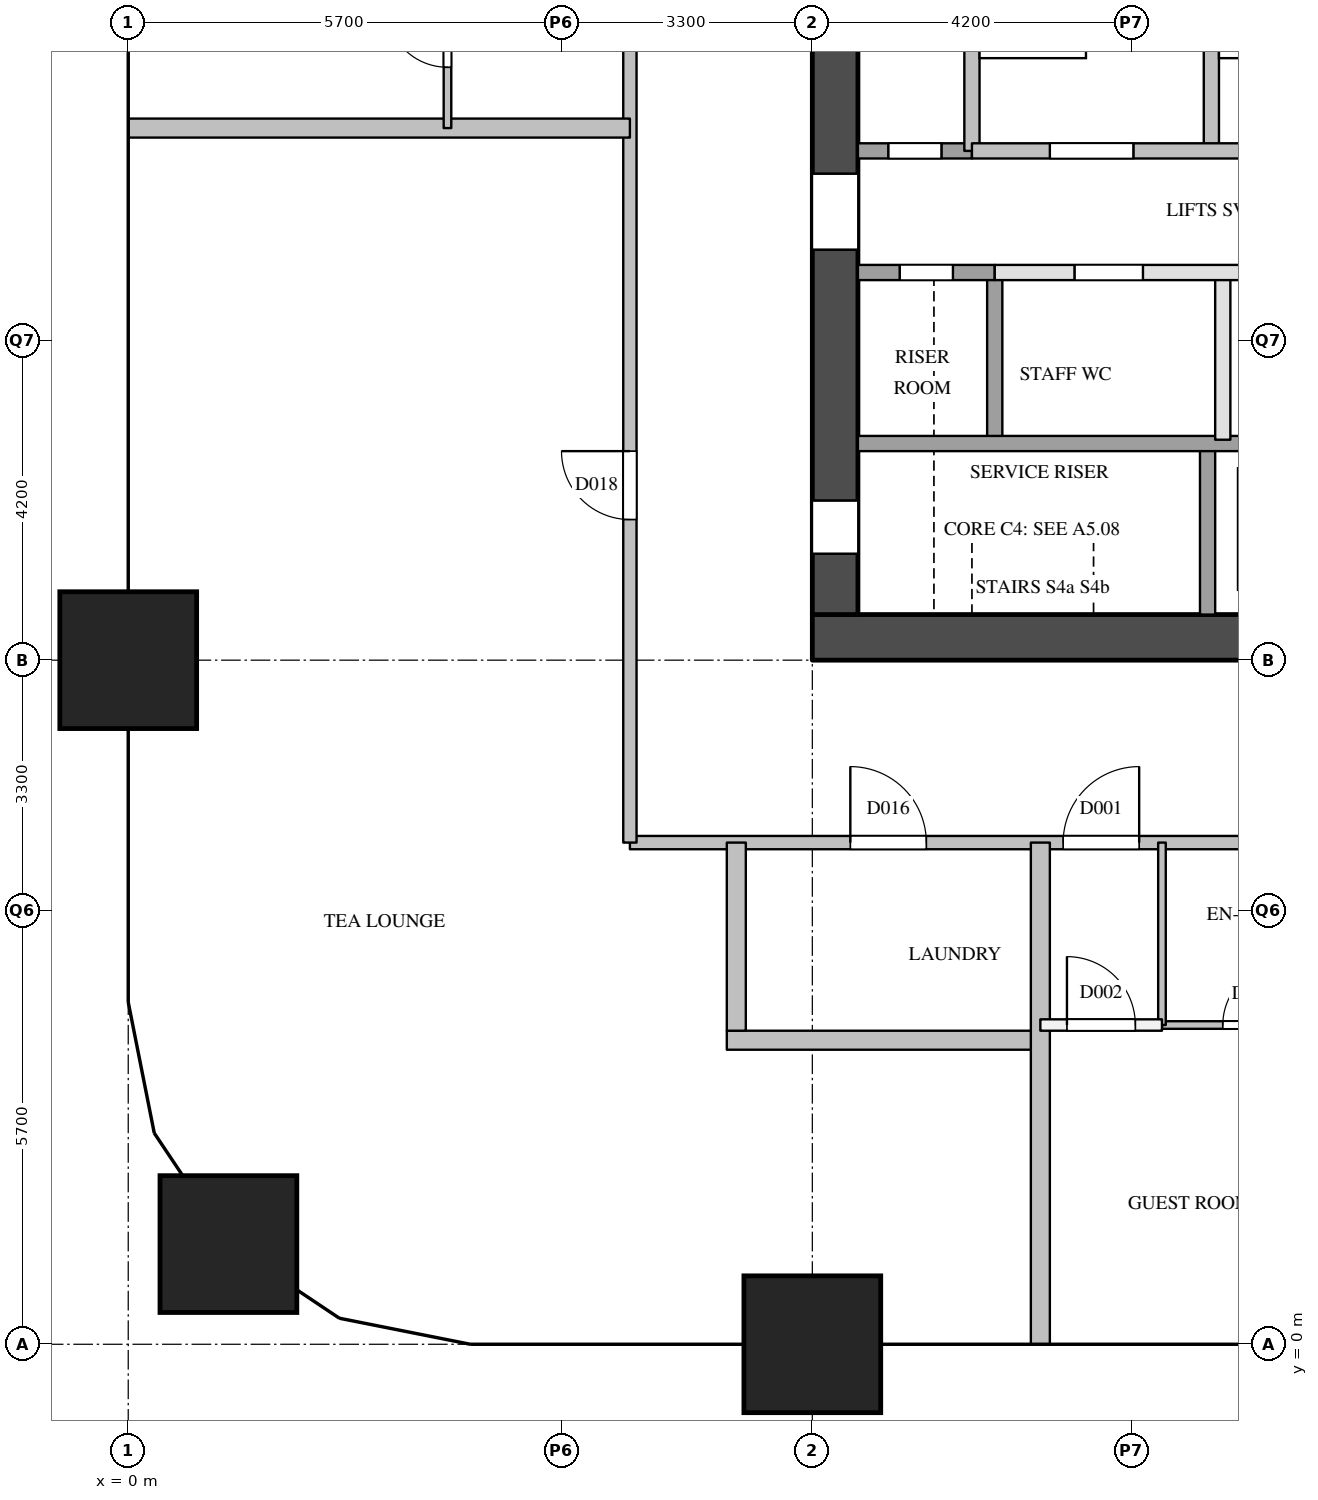
"""IFC4 building model, lengths in metres.
Left out: names, types, materials, properties, quantities, classifications, styles, units other than length and angle.
Written with IfcOpenShell. Run it as: python <this file> out.ifc"""

import sys

from ifc_helpers import new_model, si_unit, direction, frame, frame_2d, origin, origin_2d, place, context, subcontext, project, spatial, rectangle, extrude, element, fill, save


model = new_model("IFC4")
c1 = context("Model", 3, precision=1e-05, world=origin(), true_north=direction((0.0, 1.0)))
c2 = subcontext(c1, "Body", "Model", "MODEL_VIEW")
j1 = project(units=[si_unit("LENGTHUNIT", "METRE"), si_unit("PLANEANGLEUNIT", "RADIAN")], contexts=[c1])
p1 = place(None, origin())
s1 = spatial("IfcSite", under=j1, at=p1, CompositionType="ELEMENT")
p2 = place(p1, origin())
s2 = spatial("IfcBuilding", under=s1, at=p2, CompositionType="ELEMENT")
p3 = place(p2, frame((0.0, 0.0, 38.6)))
s3 = spatial("IfcBuildingStorey", under=s2, at=p3, CompositionType="ELEMENT", Elevation=38.6)
for number, where, z_axis, x_axis in (
    (1, (1.318, 1.318, 0.0), (0.0, 0.0, 1.0), (1.0, 0.0, 0.0)),
    (2, (0.0, 9.0, 0.0), (0.0, 0.0, 1.0), (1.0, 0.0, 0.0)),
    (3, (9.0, 0.0, 0.0), (0.0, 0.0, 1.0), (1.0, 0.0, 0.0)),
):
    element("IfcColumn", number, at=place(p3, frame(where, z_axis=z_axis, x_axis=x_axis)), inside=s3, PredefinedType="COLUMN", context=c2, shape_type="SweptSolid", body=[
        extrude(rectangle(XDim=1.8, YDim=1.8, at=origin_2d()), origin(), (0.0, 0.0, 1.0), 3.8),
    ])
p4 = place(p3, frame((9.0, 9.3, 0.0), z_axis=(0.0, 0.0, 1.0), x_axis=(1.0, 0.0, 0.0)))
e4 = element("IfcWall", 4, at=p4, inside=s3, PredefinedType="SHEAR", context=c2, shape_type="SweptSolid", body=[
    extrude(rectangle(XDim=9.0, YDim=0.6, at=frame_2d((4.5, 0.0))), origin(), (0.0, 0.0, 1.0), 3.5),
])
p5 = place(p3, frame((9.3, 9.6, 0.0), z_axis=(0.0, 0.0, 1.0), x_axis=(0.0, 1.0, 0.0)))
e5 = element("IfcWall", 5, at=p5, inside=s3, PredefinedType="SHEAR", context=c2, shape_type="SweptSolid", body=[
    extrude(rectangle(XDim=12.3, YDim=0.6, at=frame_2d((6.15, 0.0))), origin(), (0.0, 0.0, 1.0), 3.5),
])
p6 = place(p5, frame((0.8, 0.0, 0.0)))
e6 = element("IfcOpeningElement", 6, at=p6, cuts=e5, PredefinedType="OPENING", context=c2, shape_type="SweptSolid", body=[
    extrude(rectangle(XDim=0.7, YDim=2.1, at=frame_2d((0.35, 1.05))), frame((0.0, 0.31, 0.0), z_axis=(0.0, -1.0, 0.0), x_axis=(1.0, 0.0, 0.0)), (0.0, 0.0, 1.0), 0.62),
])
p7 = place(p5, frame((4.8, 0.0, 0.0)))
e7 = element("IfcOpeningElement", 7, at=p7, cuts=e5, PredefinedType="OPENING", context=c2, shape_type="SweptSolid", body=[
    extrude(rectangle(XDim=1.0, YDim=2.1, at=frame_2d((0.5, 1.05))), frame((0.0, 0.31, 0.0), z_axis=(0.0, -1.0, 0.0), x_axis=(1.0, 0.0, 0.0)), (0.0, 0.0, 1.0), 0.62),
])
p8 = place(p3, frame((11.1, 15.7, 0.0), z_axis=(0.0, 0.0, 1.0), x_axis=(0.0, 1.0, 0.0)))
e8 = element("IfcWall", 8, at=p8, inside=s3, PredefinedType="SOLIDWALL", context=c2, shape_type="SweptSolid", body=[
    extrude(rectangle(XDim=4.3, YDim=0.2, at=frame_2d((2.15, 0.0))), origin(), (0.0, 0.0, 1.0), 3.5),
])
p9 = place(p3, frame((11.4, 11.9, 0.0), z_axis=(0.0, 0.0, 1.0), x_axis=(0.0, 1.0, 0.0)))
e9 = element("IfcWall", 9, at=p9, inside=s3, PredefinedType="SOLIDWALL", context=c2, shape_type="SweptSolid", body=[
    extrude(rectangle(XDim=2.2, YDim=0.2, at=frame_2d((1.1, 0.0))), origin(), (0.0, 0.0, 1.0), 3.5),
])
p10 = place(p3, frame((14.2, 9.6, 0.0), z_axis=(0.0, 0.0, 1.0), x_axis=(0.0, 1.0, 0.0)))
e10 = element("IfcWall", 10, at=p10, inside=s3, PredefinedType="SOLIDWALL", context=c2, shape_type="SweptSolid", body=[
    extrude(rectangle(XDim=2.3, YDim=0.2, at=frame_2d((1.15, 0.0))), origin(), (0.0, 0.0, 1.0), 3.5),
])
p11 = place(p3, frame((14.25, 15.7, 0.0), z_axis=(0.0, 0.0, 1.0), x_axis=(0.0, 1.0, 0.0)))
e11 = element("IfcWall", 11, at=p11, inside=s3, PredefinedType="SOLIDWALL", context=c2, shape_type="SweptSolid", body=[
    extrude(rectangle(XDim=4.3, YDim=0.2, at=frame_2d((2.15, 0.0))), origin(), (0.0, 0.0, 1.0), 3.5),
])
p12 = place(p3, frame((14.4, 11.9, 0.0), z_axis=(0.0, 0.0, 1.0), x_axis=(0.0, 1.0, 0.0)))
e12 = element("IfcWall", 12, at=p12, inside=s3, PredefinedType="PARTITIONING", context=c2, shape_type="SweptSolid", body=[
    extrude(rectangle(XDim=2.2, YDim=0.2, at=frame_2d((1.1, 0.0))), origin(), (0.0, 0.0, 1.0), 3.5),
])
p13 = place(p3, frame((9.6, 11.85, 0.0), z_axis=(0.0, 0.0, 1.0), x_axis=(1.0, 0.0, 0.0)))
e13 = element("IfcWall", 13, at=p13, inside=s3, PredefinedType="SOLIDWALL", context=c2, shape_type="SweptSolid", body=[
    extrude(rectangle(XDim=7.8, YDim=0.2, at=frame_2d((3.9, 0.0))), origin(), (0.0, 0.0, 1.0), 3.5),
])
p14 = place(p3, frame((11.4, 14.1, 0.0), z_axis=(0.0, 0.0, 1.0), x_axis=(1.0, 0.0, 0.0)))
e14 = element("IfcWall", 14, at=p14, inside=s3, PredefinedType="PARTITIONING", context=c2, shape_type="SweptSolid", body=[
    extrude(rectangle(XDim=6.0, YDim=0.2, at=frame_2d((3.0, 0.0))), origin(), (0.0, 0.0, 1.0), 3.5),
])
p15 = place(p14, frame((1.05, 0.0, 0.0)))
e15 = element("IfcOpeningElement", 15, at=p15, cuts=e14, PredefinedType="OPENING", context=c2, shape_type="SweptSolid", body=[
    extrude(rectangle(XDim=0.9, YDim=2.1, at=frame_2d((0.45, 1.05))), frame((0.0, 0.11, 0.0), z_axis=(0.0, -1.0, 0.0), x_axis=(1.0, 0.0, 0.0)), (0.0, 0.0, 1.0), 0.22),
])
p16 = place(p14, frame((4.05, 0.0, 0.0)))
e16 = element("IfcOpeningElement", 16, at=p16, cuts=e14, PredefinedType="OPENING", context=c2, shape_type="SweptSolid", body=[
    extrude(rectangle(XDim=0.9, YDim=2.1, at=frame_2d((0.45, 1.05))), frame((0.0, 0.11, 0.0), z_axis=(0.0, -1.0, 0.0), x_axis=(1.0, 0.0, 0.0)), (0.0, 0.0, 1.0), 0.22),
])
p17 = place(p3, frame((9.6, 14.1, 0.0), z_axis=(0.0, 0.0, 1.0), x_axis=(1.0, 0.0, 0.0)))
e17 = element("IfcWall", 17, at=p17, inside=s3, PredefinedType="SOLIDWALL", context=c2, shape_type="SweptSolid", body=[
    extrude(rectangle(XDim=1.8, YDim=0.2, at=frame_2d((0.9, 0.0))), origin(), (0.0, 0.0, 1.0), 3.5),
])
p18 = place(p17, frame((0.55, 0.0, 0.0)))
e18 = element("IfcOpeningElement", 18, at=p18, cuts=e17, PredefinedType="OPENING", context=c2, shape_type="SweptSolid", body=[
    extrude(rectangle(XDim=0.7, YDim=2.1, at=frame_2d((0.35, 1.05))), frame((0.0, 0.11, 0.0), z_axis=(0.0, -1.0, 0.0), x_axis=(1.0, 0.0, 0.0)), (0.0, 0.0, 1.0), 0.22),
])
p19 = place(p3, frame((9.6, 15.7, 0.0), z_axis=(0.0, 0.0, 1.0), x_axis=(1.0, 0.0, 0.0)))
e19 = element("IfcWall", 19, at=p19, inside=s3, PredefinedType="SOLIDWALL", context=c2, shape_type="SweptSolid", body=[
    extrude(rectangle(XDim=1.5, YDim=0.2, at=frame_2d((0.75, 0.0))), origin(), (0.0, 0.0, 1.0), 3.5),
])
p20 = place(p19, frame((0.4, 0.0, 0.0)))
e20 = element("IfcOpeningElement", 20, at=p20, cuts=e19, PredefinedType="OPENING", context=c2, shape_type="SweptSolid", body=[
    extrude(rectangle(XDim=0.7, YDim=2.1, at=frame_2d((0.35, 1.05))), frame((0.0, 0.11, 0.0), z_axis=(0.0, -1.0, 0.0), x_axis=(1.0, 0.0, 0.0)), (0.0, 0.0, 1.0), 0.22),
])
p21 = place(p3, frame((11.1, 15.7, 0.0), z_axis=(0.0, 0.0, 1.0), x_axis=(1.0, 0.0, 0.0)))
e21 = element("IfcWall", 21, at=p21, inside=s3, PredefinedType="SOLIDWALL", context=c2, shape_type="SweptSolid", body=[
    extrude(rectangle(XDim=6.3, YDim=0.2, at=frame_2d((3.15, 0.0))), origin(), (0.0, 0.0, 1.0), 3.5),
])
p22 = place(p21, frame((4.175, 0.0, 0.0)))
e22 = element("IfcOpeningElement", 22, at=p22, cuts=e21, PredefinedType="OPENING", context=c2, shape_type="SweptSolid", body=[
    extrude(rectangle(XDim=1.1, YDim=2.1, at=frame_2d((0.55, 1.05))), frame((0.0, 0.11, 0.0), z_axis=(0.0, -1.0, 0.0), x_axis=(1.0, 0.0, 0.0)), (0.0, 0.0, 1.0), 0.22),
])
p23 = place(p21, frame((1.025, 0.0, 0.0)))
e23 = element("IfcOpeningElement", 23, at=p23, cuts=e21, PredefinedType="OPENING", context=c2, shape_type="SweptSolid", body=[
    extrude(rectangle(XDim=1.1, YDim=2.1, at=frame_2d((0.55, 1.05))), frame((0.0, 0.11, 0.0), z_axis=(0.0, -1.0, 0.0), x_axis=(1.0, 0.0, 0.0)), (0.0, 0.0, 1.0), 0.22),
])
p24 = place(p3, frame((6.6, 6.6, 0.0), z_axis=(0.0, 0.0, 1.0), x_axis=(1.0, 0.0, 0.0)))
e24 = element("IfcWall", 24, at=p24, inside=s3, PredefinedType="PARTITIONING", context=c2, shape_type="SweptSolid", body=[
    extrude(rectangle(XDim=13.8, YDim=0.175, at=frame_2d((6.9, 0.0))), origin(), (0.0, 0.0, 1.0), 3.5),
])
p25 = place(p24, frame((5.7, 0.0, 0.0)))
e25 = element("IfcOpeningElement", 25, at=p25, cuts=e24, PredefinedType="OPENING", context=c2, shape_type="SweptSolid", body=[
    extrude(rectangle(XDim=1.0, YDim=2.1, at=frame_2d((0.5, 1.05))), frame((0.0, 0.097, 0.0), z_axis=(0.0, -1.0, 0.0), x_axis=(1.0, 0.0, 0.0)), (0.0, 0.0, 1.0), 0.195),
])
p26 = place(p24, frame((9.7, 0.0, 0.0)))
e26 = element("IfcOpeningElement", 26, at=p26, cuts=e24, PredefinedType="OPENING", context=c2, shape_type="SweptSolid", body=[
    extrude(rectangle(XDim=1.0, YDim=2.1, at=frame_2d((0.5, 1.05))), frame((0.0, 0.097, 0.0), z_axis=(0.0, -1.0, 0.0), x_axis=(1.0, 0.0, 0.0)), (0.0, 0.0, 1.0), 0.195),
])
p27 = place(p24, frame((2.9, 0.0, 0.0)))
e27 = element("IfcOpeningElement", 27, at=p27, cuts=e24, PredefinedType="OPENING", context=c2, shape_type="SweptSolid", body=[
    extrude(rectangle(XDim=1.0, YDim=2.1, at=frame_2d((0.5, 1.05))), frame((0.0, 0.097, 0.0), z_axis=(0.0, -1.0, 0.0), x_axis=(1.0, 0.0, 0.0)), (0.0, 0.0, 1.0), 0.195),
])
p28 = place(p3, frame((6.6, 6.6, 0.0), z_axis=(0.0, 0.0, 1.0), x_axis=(0.0, 1.0, 0.0)))
e28 = element("IfcWall", 28, at=p28, inside=s3, PredefinedType="PARTITIONING", context=c2, shape_type="SweptSolid", body=[
    extrude(rectangle(XDim=18.3, YDim=0.175, at=frame_2d((9.15, 0.0))), origin(), (0.0, 0.0, 1.0), 3.5),
])
p29 = place(p28, frame((4.25, 0.0, 0.0)))
e29 = element("IfcOpeningElement", 29, at=p29, cuts=e28, PredefinedType="OPENING", context=c2, shape_type="SweptSolid", body=[
    extrude(rectangle(XDim=0.9, YDim=2.1, at=frame_2d((0.45, 1.05))), frame((0.0, 0.097, 0.0), z_axis=(0.0, -1.0, 0.0), x_axis=(1.0, 0.0, 0.0)), (0.0, 0.0, 1.0), 0.195),
])
p30 = place(p28, frame((12.1, 0.0, 0.0)))
e30 = element("IfcOpeningElement", 30, at=p30, cuts=e28, PredefinedType="OPENING", context=c2, shape_type="SweptSolid", body=[
    extrude(rectangle(XDim=1.0, YDim=2.1, at=frame_2d((0.5, 1.05))), frame((0.0, 0.097, 0.0), z_axis=(0.0, -1.0, 0.0), x_axis=(1.0, 0.0, 0.0)), (0.0, 0.0, 1.0), 0.195),
])
p31 = place(p3, frame((12.0, 4.2, 0.0), z_axis=(0.0, 0.0, 1.0), x_axis=(1.0, 0.0, 0.0)))
e31 = element("IfcWall", 31, at=p31, inside=s3, PredefinedType="PARTITIONING", context=c2, shape_type="SweptSolid", body=[
    extrude(rectangle(XDim=1.6, YDim=0.15, at=frame_2d((0.8, 0.0))), origin(), (0.0, 0.0, 1.0), 3.5),
])
p32 = place(p31, frame((0.35, 0.0, 0.0)))
e32 = element("IfcOpeningElement", 32, at=p32, cuts=e31, PredefinedType="OPENING", context=c2, shape_type="SweptSolid", body=[
    extrude(rectangle(XDim=0.9, YDim=2.1, at=frame_2d((0.45, 1.05))), frame((0.0, 0.085, 0.0), z_axis=(0.0, -1.0, 0.0), x_axis=(1.0, 0.0, 0.0)), (0.0, 0.0, 1.0), 0.17),
])
p33 = place(p3, frame((7.875, 4.0, 0.0), z_axis=(0.0, 0.0, 1.0), x_axis=(1.0, 0.0, 0.0)))
e33 = element("IfcWall", 33, at=p33, inside=s3, PredefinedType="PARTITIONING", context=c2, shape_type="SweptSolid", body=[
    extrude(rectangle(XDim=4.125, YDim=0.25, at=frame_2d((2.062, 0.0))), origin(), (0.0, 0.0, 1.0), 3.5),
])
p34 = place(p3, frame((0.0, 16.0, 0.0), z_axis=(0.0, 0.0, 1.0), x_axis=(1.0, 0.0, 0.0)))
e34 = element("IfcWall", 34, at=p34, inside=s3, PredefinedType="PARTITIONING", context=c2, shape_type="SweptSolid", body=[
    extrude(rectangle(XDim=6.6, YDim=0.25, at=frame_2d((3.3, 0.0))), origin(), (0.0, 0.0, 1.0), 2.5),
])
p35 = place(p3, frame((8.0, 4.125, 0.0), z_axis=(0.0, 0.0, 1.0), x_axis=(0.0, 1.0, 0.0)))
e35 = element("IfcWall", 35, at=p35, inside=s3, PredefinedType="PARTITIONING", context=c2, shape_type="SweptSolid", body=[
    extrude(rectangle(XDim=2.475, YDim=0.25, at=frame_2d((1.238, 0.0))), origin(), (0.0, 0.0, 1.0), 3.5),
])
p36 = place(p3, frame((12.0, 0.0, 0.0), z_axis=(0.0, 0.0, 1.0), x_axis=(0.0, 1.0, 0.0)))
e36 = element("IfcWall", 36, at=p36, inside=s3, PredefinedType="PARTITIONING", context=c2, shape_type="SweptSolid", body=[
    extrude(rectangle(XDim=6.6, YDim=0.25, at=frame_2d((3.3, 0.0))), origin(), (0.0, 0.0, 1.0), 2.5),
])
p37 = place(p3, frame((13.6, 4.2, 0.0), z_axis=(0.0, 0.0, 1.0), x_axis=(1.0, 0.0, 0.0)))
e37 = element("IfcWall", 37, at=p37, inside=s3, PredefinedType="PARTITIONING", context=c2, shape_type="SweptSolid", body=[
    extrude(rectangle(XDim=2.4, YDim=0.1, at=frame_2d((1.2, 0.0))), origin(), (0.0, 0.0, 1.0), 3.5),
])
p38 = place(p37, frame((0.8, 0.0, 0.0)))
e38 = element("IfcOpeningElement", 38, at=p38, cuts=e37, PredefinedType="OPENING", context=c2, shape_type="SweptSolid", body=[
    extrude(rectangle(XDim=0.8, YDim=2.1, at=frame_2d((0.4, 1.05))), frame((0.0, 0.06, 0.0), z_axis=(0.0, -1.0, 0.0), x_axis=(1.0, 0.0, 0.0)), (0.0, 0.0, 1.0), 0.12),
])
p39 = place(p3, frame((4.2, 16.0, 0.0), z_axis=(0.0, 0.0, 1.0), x_axis=(0.0, 1.0, 0.0)))
e39 = element("IfcWall", 39, at=p39, inside=s3, PredefinedType="PARTITIONING", context=c2, shape_type="SweptSolid", body=[
    extrude(rectangle(XDim=2.4, YDim=0.1, at=frame_2d((1.2, 0.0))), origin(), (0.0, 0.0, 1.0), 3.5),
])
p40 = place(p39, frame((0.8, 0.0, 0.0)))
e40 = element("IfcOpeningElement", 40, at=p40, cuts=e39, PredefinedType="OPENING", context=c2, shape_type="SweptSolid", body=[
    extrude(rectangle(XDim=0.8, YDim=2.1, at=frame_2d((0.4, 1.05))), frame((0.0, 0.06, 0.0), z_axis=(0.0, -1.0, 0.0), x_axis=(1.0, 0.0, 0.0)), (0.0, 0.0, 1.0), 0.12),
])
p41 = place(p3, frame((13.6, 4.2, 0.0), z_axis=(0.0, 0.0, 1.0), x_axis=(0.0, 1.0, 0.0)))
e41 = element("IfcWall", 41, at=p41, inside=s3, PredefinedType="PARTITIONING", context=c2, shape_type="SweptSolid", body=[
    extrude(rectangle(XDim=2.4, YDim=0.1, at=frame_2d((1.2, 0.0))), origin(), (0.0, 0.0, 1.0), 3.5),
])
p42 = place(p23, origin())
e42 = element("IfcDoor", 42, at=p42, inside=s3, OperationType="SINGLE_SWING_LEFT", PredefinedType="DOOR", context=c2, shape_type="SweptSolid", body=[
    extrude(rectangle(XDim=1.1, YDim=2.1, at=frame_2d((0.55, 1.05))), frame((0.0, 0.025, 0.0), z_axis=(0.0, -1.0, 0.0), x_axis=(1.0, 0.0, 0.0)), (0.0, 0.0, 1.0), 0.05),
])
fill(e23, e42)
p43 = place(p20, origin())
e43 = element("IfcDoor", 43, at=p43, inside=s3, OperationType="SINGLE_SWING_LEFT", PredefinedType="DOOR", context=c2, shape_type="SweptSolid", body=[
    extrude(rectangle(XDim=0.7, YDim=2.1, at=frame_2d((0.35, 1.05))), frame((0.0, 0.025, 0.0), z_axis=(0.0, -1.0, 0.0), x_axis=(1.0, 0.0, 0.0)), (0.0, 0.0, 1.0), 0.05),
])
fill(e20, e43)
p44 = place(p18, origin())
e44 = element("IfcDoor", 44, at=p44, inside=s3, OperationType="SINGLE_SWING_LEFT", PredefinedType="DOOR", context=c2, shape_type="SweptSolid", body=[
    extrude(rectangle(XDim=0.7, YDim=2.1, at=frame_2d((0.35, 1.05))), frame((0.0, 0.025, 0.0), z_axis=(0.0, -1.0, 0.0), x_axis=(1.0, 0.0, 0.0)), (0.0, 0.0, 1.0), 0.05),
])
fill(e18, e44)
p45 = place(p6, origin())
e45 = element("IfcDoor", 45, at=p45, inside=s3, OperationType="SINGLE_SWING_LEFT", PredefinedType="DOOR", context=c2, shape_type="SweptSolid", body=[
    extrude(rectangle(XDim=0.7, YDim=2.1, at=frame_2d((0.35, 1.05))), frame((0.0, 0.025, 0.0), z_axis=(0.0, -1.0, 0.0), x_axis=(1.0, 0.0, 0.0)), (0.0, 0.0, 1.0), 0.05),
])
fill(e6, e45)
p46 = place(p7, origin())
e46 = element("IfcDoor", 46, at=p46, inside=s3, OperationType="SINGLE_SWING_LEFT", PredefinedType="DOOR", context=c2, shape_type="SweptSolid", body=[
    extrude(rectangle(XDim=1.0, YDim=2.1, at=frame_2d((0.5, 1.05))), frame((0.0, 0.025, 0.0), z_axis=(0.0, -1.0, 0.0), x_axis=(1.0, 0.0, 0.0)), (0.0, 0.0, 1.0), 0.05),
])
fill(e7, e46)
p47 = place(p15, origin())
e47 = element("IfcDoor", 47, at=p47, inside=s3, OperationType="SINGLE_SWING_LEFT", PredefinedType="DOOR", context=c2, shape_type="SweptSolid", body=[
    extrude(rectangle(XDim=0.9, YDim=2.1, at=frame_2d((0.45, 1.05))), frame((0.0, 0.025, 0.0), z_axis=(0.0, -1.0, 0.0), x_axis=(1.0, 0.0, 0.0)), (0.0, 0.0, 1.0), 0.05),
])
fill(e15, e47)
p48 = place(p25, origin())
e48 = element("IfcDoor", 48, at=p48, inside=s3, OperationType="SINGLE_SWING_RIGHT", PredefinedType="DOOR", context=c2, shape_type="SweptSolid", body=[
    extrude(rectangle(XDim=1.0, YDim=2.1, at=frame_2d((0.5, 1.05))), frame((0.0, 0.025, 0.0), z_axis=(0.0, -1.0, 0.0), x_axis=(1.0, 0.0, 0.0)), (0.0, 0.0, 1.0), 0.05),
])
fill(e25, e48)
p49 = place(p32, origin())
e49 = element("IfcDoor", 49, at=p49, inside=s3, OperationType="SINGLE_SWING_LEFT", PredefinedType="DOOR", context=c2, shape_type="SweptSolid", body=[
    extrude(rectangle(XDim=0.9, YDim=2.1, at=frame_2d((0.45, 1.05))), frame((0.0, 0.025, 0.0), z_axis=(0.0, -1.0, 0.0), x_axis=(1.0, 0.0, 0.0)), (0.0, 0.0, 1.0), 0.05),
])
fill(e32, e49)
p50 = place(p38, origin())
e50 = element("IfcDoor", 50, at=p50, inside=s3, OperationType="SINGLE_SWING_RIGHT", PredefinedType="DOOR", context=c2, shape_type="SweptSolid", body=[
    extrude(rectangle(XDim=0.8, YDim=2.1, at=frame_2d((0.4, 1.05))), frame((0.0, 0.025, 0.0), z_axis=(0.0, -1.0, 0.0), x_axis=(1.0, 0.0, 0.0)), (0.0, 0.0, 1.0), 0.05),
])
fill(e38, e50)
p51 = place(p27, origin())
e51 = element("IfcDoor", 51, at=p51, inside=s3, OperationType="SINGLE_SWING_LEFT", PredefinedType="DOOR", context=c2, shape_type="SweptSolid", body=[
    extrude(rectangle(XDim=1.0, YDim=2.1, at=frame_2d((0.5, 1.05))), frame((0.0, 0.025, 0.0), z_axis=(0.0, -1.0, 0.0), x_axis=(1.0, 0.0, 0.0)), (0.0, 0.0, 1.0), 0.05),
])
fill(e27, e51)
p52 = place(p29, origin())
e52 = element("IfcDoor", 52, at=p52, inside=s3, OperationType="SINGLE_SWING_RIGHT", PredefinedType="DOOR", context=c2, shape_type="SweptSolid", body=[
    extrude(rectangle(XDim=0.9, YDim=2.1, at=frame_2d((0.45, 1.05))), frame((0.0, 0.025, 0.0), z_axis=(0.0, -1.0, 0.0), x_axis=(1.0, 0.0, 0.0)), (0.0, 0.0, 1.0), 0.05),
])
fill(e29, e52)
p53 = place(p40, origin())
e53 = element("IfcDoor", 53, at=p53, inside=s3, OperationType="SINGLE_SWING_RIGHT", PredefinedType="DOOR", context=c2, shape_type="SweptSolid", body=[
    extrude(rectangle(XDim=0.8, YDim=2.1, at=frame_2d((0.4, 1.05))), frame((0.0, 0.025, 0.0), z_axis=(0.0, -1.0, 0.0), x_axis=(1.0, 0.0, 0.0)), (0.0, 0.0, 1.0), 0.05),
])
fill(e40, e53)
save(model, sys.argv[1])
